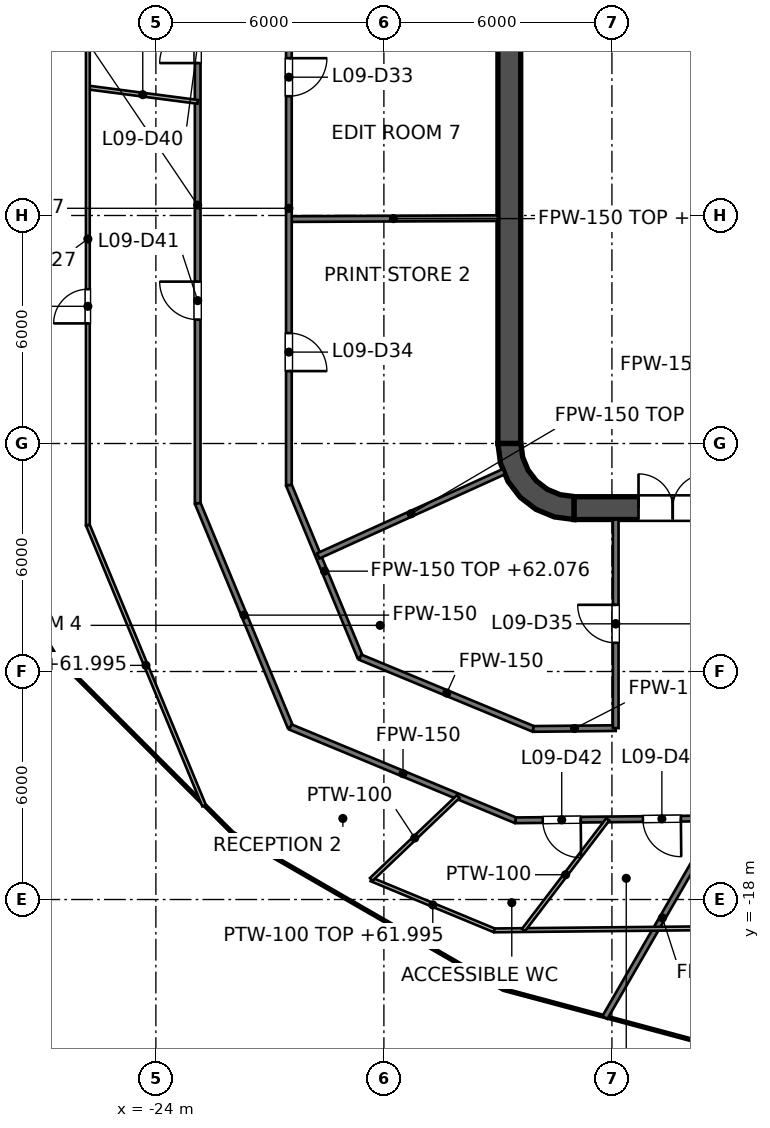
"""IFC4 building model, lengths in metres.
Left out: names, types, materials, properties, quantities, classifications, styles, units other than length and angle.
Written with IfcOpenShell. Run it as: python <this file> out.ifc"""

import sys

from ifc_helpers import new_model, si_unit, direction, frame, frame_2d, origin, place, context, subcontext, project, spatial, polyline, rectangle, outline, extrude, element, fill, save


model = new_model("IFC4")
c1 = context("Model", 3, precision=1e-05, world=origin(), true_north=direction((0.0, 1.0)))
c2 = subcontext(c1, "Body", "Model", "MODEL_VIEW")
j1 = project(units=[si_unit("LENGTHUNIT", "METRE"), si_unit("PLANEANGLEUNIT", "RADIAN")], contexts=[c1])
p1 = place(None, origin())
s1 = spatial("IfcSite", under=j1, at=p1, CompositionType="ELEMENT")
p2 = place(p1, origin())
s2 = spatial("IfcBuilding", under=s1, at=p2, CompositionType="ELEMENT")
p3 = place(p2, frame((0.0, 0.0, 58.8)))
s3 = spatial("IfcBuildingStorey", under=s2, at=p3, CompositionType="ELEMENT", Elevation=58.8)
p4 = place(p3, frame((-13.0, -7.7, 0.0), z_axis=(0.0, 0.0, 1.0), x_axis=(1.0, 0.0, 0.0)))
e1 = element("IfcWall", 1, at=p4, inside=s3, PredefinedType="SHEAR", context=c2, shape_type="SweptSolid", body=[
    extrude(rectangle(XDim=26.0, YDim=0.6, at=frame_2d((13.0, 0.0))), origin(), (0.0, 0.0, 1.0), 4.2),
])
p5 = place(p4, frame((1.7, 0.0, 0.0)))
e2 = element("IfcOpeningElement", 2, at=p5, cuts=e1, PredefinedType="OPENING", context=c2, shape_type="SweptSolid", body=[
    extrude(rectangle(XDim=1.8, YDim=2.1, at=frame_2d((0.9, 1.05))), frame((0.0, 0.3, 0.0), z_axis=(0.0, -1.0, 0.0), x_axis=(1.0, 0.0, 0.0)), (0.0, 0.0, 1.0), 0.6),
])
p6 = place(p4, frame((22.5, 0.0, 0.0)))
e3 = element("IfcOpeningElement", 3, at=p6, cuts=e1, PredefinedType="OPENING", context=c2, shape_type="SweptSolid", body=[
    extrude(rectangle(XDim=1.8, YDim=2.1, at=frame_2d((0.9, 1.05))), frame((0.0, 0.3, 0.0), z_axis=(0.0, -1.0, 0.0), x_axis=(1.0, 0.0, 0.0)), (0.0, 0.0, 1.0), 0.6),
])
p7 = place(p3, frame((-14.7, -6.0, 0.0), z_axis=(0.0, 0.0, 1.0), x_axis=(0.0, 1.0, 0.0)))
e4 = element("IfcWall", 4, at=p7, inside=s3, PredefinedType="SHEAR", context=c2, shape_type="SweptSolid", body=[
    extrude(rectangle(XDim=12.0, YDim=0.6, at=frame_2d((6.0, 0.0))), origin(), (0.0, 0.0, 1.0), 4.2),
])
p8 = place(p3, origin())
e5 = element("IfcWall", 5, at=p8, inside=s3, PredefinedType="SHEAR", context=c2, shape_type="SweptSolid", body=[
    extrude(outline(polyline([(-13.0, -8.0), (-13.0, -7.395), (-13.361, -7.347), (-13.698, -7.208), (-13.986, -6.986), (-14.208, -6.698), (-14.347, -6.361), (-14.395, -6.0), (-15.0, -6.0), (-14.932, -6.518), (-14.732, -7.0), (-14.414, -7.414), (-14.0, -7.732), (-13.518, -7.932), (-13.0, -8.0)])), origin(), (0.0, 0.0, 1.0), 4.2),
])
p9 = place(p3, frame((-11.8, -7.4, 0.0), z_axis=(0.0, 0.0, 1.0), x_axis=(0.0, 1.0, 0.0)))
e6 = element("IfcWall", 6, at=p9, inside=s3, PredefinedType="SOLIDWALL", context=c2, shape_type="SweptSolid", body=[
    extrude(rectangle(XDim=14.8, YDim=0.4, at=frame_2d((7.4, 0.0))), origin(), (0.0, 0.0, 1.0), 4.05),
])
p10 = place(p9, frame((11.2, 0.0, 0.0)))
e7 = element("IfcOpeningElement", 7, at=p10, cuts=e6, PredefinedType="OPENING", context=c2, shape_type="SweptSolid", body=[
    extrude(rectangle(XDim=1.1, YDim=2.1, at=frame_2d((0.55, 1.05))), frame((0.0, 0.2, 0.0), z_axis=(0.0, -1.0, 0.0), x_axis=(1.0, 0.0, 0.0)), (0.0, 0.0, 1.0), 0.4),
])
p11 = place(p9, frame((8.3, 0.0, 0.0)))
e8 = element("IfcOpeningElement", 8, at=p11, cuts=e6, PredefinedType="OPENING", context=c2, shape_type="SweptSolid", body=[
    extrude(rectangle(XDim=1.1, YDim=2.1, at=frame_2d((0.55, 1.05))), frame((0.0, 0.2, 0.0), z_axis=(0.0, -1.0, 0.0), x_axis=(1.0, 0.0, 0.0)), (0.0, 0.0, 1.0), 0.4),
])
p12 = place(p9, frame((5.4, 0.0, 0.0)))
e9 = element("IfcOpeningElement", 9, at=p12, cuts=e6, PredefinedType="OPENING", context=c2, shape_type="SweptSolid", body=[
    extrude(rectangle(XDim=1.1, YDim=2.1, at=frame_2d((0.55, 1.05))), frame((0.0, 0.2, 0.0), z_axis=(0.0, -1.0, 0.0), x_axis=(1.0, 0.0, 0.0)), (0.0, 0.0, 1.0), 0.4),
])
p13 = place(p9, frame((13.552, 0.0, 0.0)))
e10 = element("IfcOpeningElement", 10, at=p13, cuts=e6, PredefinedType="OPENING", context=c2, shape_type="SweptSolid", body=[
    extrude(rectangle(XDim=0.9, YDim=2.1, at=frame_2d((0.45, 1.05))), frame((0.0, 0.2, 0.0), z_axis=(0.0, -1.0, 0.0), x_axis=(1.0, 0.0, 0.0)), (0.0, 0.0, 1.0), 0.4),
])
p14 = place(p9, frame((0.347, 0.0, 0.0)))
e11 = element("IfcOpeningElement", 11, at=p14, cuts=e6, PredefinedType="OPENING", context=c2, shape_type="SweptSolid", body=[
    extrude(rectangle(XDim=0.9, YDim=2.1, at=frame_2d((0.45, 1.05))), frame((0.0, 0.2, 0.0), z_axis=(0.0, -1.0, 0.0), x_axis=(1.0, 0.0, 0.0)), (0.0, 0.0, 1.0), 0.4),
])
e12 = element("IfcWall", 12, at=p8, inside=s3, PredefinedType="SOLIDWALL", context=c2, shape_type="SweptSolid", body=[
    extrude(outline(polyline([(-12.0, -5.925), (-12.0, -5.675), (-14.15, -5.675), (-14.15, -3.025), (-12.0, -3.025), (-12.0, -2.775), (-14.15, -2.775), (-14.15, -0.125), (-12.0, -0.125), (-12.0, 0.125), (-14.15, 0.125), (-14.15, 2.775), (-12.0, 2.775), (-12.0, 3.025), (-14.15, 3.025), (-14.15, 5.675), (-12.0, 5.675), (-12.0, 5.925), (-14.15, 5.925), (-14.4, 5.925), (-14.4, 5.675), (-14.4, 3.025), (-14.4, 2.775), (-14.4, 0.125), (-14.4, -0.125), (-14.4, -2.775), (-14.4, -3.025), (-14.4, -5.675), (-14.4, -5.925), (-14.15, -5.925), (-12.0, -5.925)])), origin(), (0.0, 0.0, 1.0), 4.05),
])
p15 = place(p3, frame((-22.9, -7.572, 0.0), z_axis=(0.0, 0.0, 1.0), x_axis=(0.382860357704, -0.923806227788, 0.0)))
e13 = element("IfcWall", 13, at=p15, inside=s3, PredefinedType="PARTITIONING", context=c2, shape_type="SweptSolid", body=[
    extrude(rectangle(XDim=6.374, YDim=0.15, at=frame_2d((3.187, 0.0))), origin(), (0.0, 0.0, 1.0), 3.195),
])
p16 = place(p3, frame((-20.5, -7.095, 0.0), z_axis=(0.0, 0.0, 1.0), x_axis=(0.382878184095, -0.923798839653, 0.0)))
e14 = element("IfcWall", 14, at=p16, inside=s3, PredefinedType="PARTITIONING", context=c2, shape_type="SweptSolid", body=[
    extrude(rectangle(XDim=4.902, YDim=0.15, at=frame_2d((2.451, 0.0))), origin(), (0.0, 0.0, 1.0), 3.276),
])
p17 = place(p3, frame((-20.46, -13.46, 0.0), z_axis=(0.0, 0.0, 1.0), x_axis=(0.9237825057, -0.382917591869, 0.0)))
e15 = element("IfcWall", 15, at=p17, inside=s3, PredefinedType="PARTITIONING", context=c2, shape_type="SweptSolid", body=[
    extrude(rectangle(XDim=6.415, YDim=0.15, at=frame_2d((3.208, 0.0))), origin(), (0.0, 0.0, 1.0), 3.195),
])
p18 = place(p3, frame((-18.623, -11.623, 0.0), z_axis=(0.0, 0.0, 1.0), x_axis=(0.923791670587, -0.38289548098, 0.0)))
e16 = element("IfcWall", 16, at=p18, inside=s3, PredefinedType="PARTITIONING", context=c2, shape_type="SweptSolid", body=[
    extrude(rectangle(XDim=4.931, YDim=0.15, at=frame_2d((2.465, 0.0))), origin(), (0.0, 0.0, 1.0), 3.195),
])
p19 = place(p3, frame((-20.5, -0.094, 0.0), z_axis=(0.0, 0.0, 1.0), x_axis=(0.999990148138, 0.004438876723, 0.0)))
e17 = element("IfcWall", 17, at=p19, inside=s3, PredefinedType="PARTITIONING", context=c2, shape_type="SweptSolid", body=[
    extrude(rectangle(XDim=5.5, YDim=0.15, at=frame_2d((2.75, 0.0))), origin(), (0.0, 0.0, 1.0), 3.127),
])
p20 = place(p3, frame((-14.534, -15.916, 0.0), z_axis=(0.0, 0.0, 1.0), x_axis=(0.999950637767, 0.009935896005, 0.0)))
e18 = element("IfcWall", 18, at=p20, inside=s3, PredefinedType="PARTITIONING", context=c2, shape_type="SweptSolid", body=[
    extrude(rectangle(XDim=33.123, YDim=0.15, at=frame_2d((16.561, 0.0))), origin(), (0.0, 0.0, 1.0), 3.127),
])
p21 = place(p20, frame((0.713, 0.0, 0.0)))
e19 = element("IfcOpeningElement", 19, at=p21, cuts=e18, PredefinedType="OPENING", context=c2, shape_type="SweptSolid", body=[
    extrude(rectangle(XDim=1.0, YDim=2.1, at=frame_2d((0.5, 1.05))), frame((0.0, 0.075, 0.0), z_axis=(0.0, -1.0, 0.0), x_axis=(1.0, 0.0, 0.0)), (0.0, 0.0, 1.0), 0.15),
])
p22 = place(p20, frame((3.349, 0.0, 0.0)))
e20 = element("IfcOpeningElement", 20, at=p22, cuts=e18, PredefinedType="OPENING", context=c2, shape_type="SweptSolid", body=[
    extrude(rectangle(XDim=1.0, YDim=2.1, at=frame_2d((0.5, 1.05))), frame((0.0, 0.075, 0.0), z_axis=(0.0, -1.0, 0.0), x_axis=(1.0, 0.0, 0.0)), (0.0, 0.0, 1.0), 0.15),
])
p23 = place(p20, frame((16.111, 0.0, 0.0)))
e21 = element("IfcOpeningElement", 21, at=p23, cuts=e18, PredefinedType="OPENING", context=c2, shape_type="SweptSolid", body=[
    extrude(rectangle(XDim=1.0, YDim=2.1, at=frame_2d((0.5, 1.05))), frame((0.0, 0.075, 0.0), z_axis=(0.0, -1.0, 0.0), x_axis=(1.0, 0.0, 0.0)), (0.0, 0.0, 1.0), 0.15),
])
p24 = place(p20, frame((25.386, 0.0, 0.0)))
e22 = element("IfcOpeningElement", 22, at=p24, cuts=e18, PredefinedType="OPENING", context=c2, shape_type="SweptSolid", body=[
    extrude(rectangle(XDim=1.0, YDim=2.1, at=frame_2d((0.5, 1.05))), frame((0.0, 0.075, 0.0), z_axis=(0.0, -1.0, 0.0), x_axis=(1.0, 0.0, 0.0)), (0.0, 0.0, 1.0), 0.15),
])
p25 = place(p3, frame((-14.068, -13.511, 0.0), z_axis=(0.0, 0.0, 1.0), x_axis=(0.999950911515, 0.009908307647, 0.0)))
e23 = element("IfcWall", 23, at=p25, inside=s3, PredefinedType="PARTITIONING", context=c2, shape_type="SweptSolid", body=[
    extrude(rectangle(XDim=2.168, YDim=0.15, at=frame_2d((1.084, 0.0))), origin(), (0.0, 0.0, 1.0), 3.195),
])
p26 = place(p3, frame((-19.728, -8.958, 0.0), z_axis=(0.0, 0.0, 1.0), x_axis=(0.910629511797, 0.413223779863, 0.0)))
e24 = element("IfcWall", 24, at=p26, inside=s3, PredefinedType="PARTITIONING", context=c2, shape_type="SweptSolid", body=[
    extrude(rectangle(XDim=5.368, YDim=0.15, at=frame_2d((2.684, 0.0))), origin(), (0.0, 0.0, 1.0), 4.05),
])
p27 = place(p3, frame((-12.184, -21.103, 0.0), z_axis=(0.0, 0.0, 1.0), x_axis=(0.500022810783, 0.866012233572, 0.0)))
e25 = element("IfcWall", 25, at=p27, inside=s3, PredefinedType="PARTITIONING", context=c2, shape_type="SweptSolid", body=[
    extrude(rectangle(XDim=6.051, YDim=0.15, at=frame_2d((3.025, 0.0))), origin(), (0.0, 0.0, 1.0), 3.502),
])
p28 = place(p3, frame((-11.9, -13.49, 0.0), z_axis=(0.0, 0.0, 1.0), x_axis=(0.0, 1.0, 0.0)))
e26 = element("IfcWall", 26, at=p28, inside=s3, PredefinedType="PARTITIONING", context=c2, shape_type="SweptSolid", body=[
    extrude(rectangle(XDim=5.49, YDim=0.15, at=frame_2d((2.745, 0.0))), origin(), (0.0, 0.0, 1.0), 3.195),
])
p29 = place(p28, frame((2.245, 0.0, 0.0)))
e27 = element("IfcOpeningElement", 27, at=p29, cuts=e26, PredefinedType="OPENING", context=c2, shape_type="SweptSolid", body=[
    extrude(rectangle(XDim=1.0, YDim=2.1, at=frame_2d((0.5, 1.05))), frame((0.0, 0.075, 0.0), z_axis=(0.0, -1.0, 0.0), x_axis=(1.0, 0.0, 0.0)), (0.0, 0.0, 1.0), 0.15),
])
p30 = place(p3, frame((-20.5, -7.095, 0.0), z_axis=(0.0, 0.0, 1.0), x_axis=(0.0, 1.0, 0.0)))
e28 = element("IfcWall", 28, at=p30, inside=s3, PredefinedType="PARTITIONING", context=c2, shape_type="SweptSolid", body=[
    extrude(rectangle(XDim=14.569, YDim=0.15, at=frame_2d((7.285, 0.0))), origin(), (0.0, 0.0, 1.0), 3.127),
])
p31 = place(p30, frame((10.234, 0.0, 0.0)))
e29 = element("IfcOpeningElement", 29, at=p31, cuts=e28, PredefinedType="OPENING", context=c2, shape_type="SweptSolid", body=[
    extrude(rectangle(XDim=1.0, YDim=2.1, at=frame_2d((0.5, 1.05))), frame((0.0, 0.075, 0.0), z_axis=(0.0, -1.0, 0.0), x_axis=(1.0, 0.0, 0.0)), (0.0, 0.0, 1.0), 0.15),
])
p32 = place(p30, frame((3.0, 0.0, 0.0)))
e30 = element("IfcOpeningElement", 30, at=p32, cuts=e28, PredefinedType="OPENING", context=c2, shape_type="SweptSolid", body=[
    extrude(rectangle(XDim=1.0, YDim=2.1, at=frame_2d((0.5, 1.05))), frame((0.0, 0.075, 0.0), z_axis=(0.0, -1.0, 0.0), x_axis=(1.0, 0.0, 0.0)), (0.0, 0.0, 1.0), 0.15),
])
p33 = place(p3, frame((-22.9, -7.572, 0.0), z_axis=(0.0, 0.0, 1.0), x_axis=(0.0, 1.0, 0.0)))
e31 = element("IfcWall", 31, at=p33, inside=s3, PredefinedType="PARTITIONING", context=c2, shape_type="SweptSolid", body=[
    extrude(rectangle(XDim=15.689, YDim=0.15, at=frame_2d((7.844, 0.0))), origin(), (0.0, 0.0, 1.0), 3.127),
])
p34 = place(p33, frame((11.583, 0.0, 0.0)))
e32 = element("IfcOpeningElement", 32, at=p34, cuts=e31, PredefinedType="OPENING", context=c2, shape_type="SweptSolid", body=[
    extrude(rectangle(XDim=1.0, YDim=2.1, at=frame_2d((0.5, 1.05))), frame((0.0, 0.075, 0.0), z_axis=(0.0, -1.0, 0.0), x_axis=(1.0, 0.0, 0.0)), (0.0, 0.0, 1.0), 0.15),
])
p35 = place(p33, frame((4.832, 0.0, 0.0)))
e33 = element("IfcOpeningElement", 33, at=p35, cuts=e31, PredefinedType="OPENING", context=c2, shape_type="SweptSolid", body=[
    extrude(rectangle(XDim=1.0, YDim=2.1, at=frame_2d((0.5, 1.05))), frame((0.0, 0.075, 0.0), z_axis=(0.0, -1.0, 0.0), x_axis=(1.0, 0.0, 0.0)), (0.0, 0.0, 1.0), 0.15),
])
p36 = place(p3, frame((-25.79, -8.147, 0.0), z_axis=(0.0, 0.0, 1.0), x_axis=(0.3827816734, -0.923838833623, 0.0)))
e34 = element("IfcWall", 34, at=p36, inside=s3, PredefinedType="PARTITIONING", context=c2, shape_type="SweptSolid", body=[
    extrude(rectangle(XDim=7.992, YDim=0.1, at=frame_2d((3.996, 0.0))), origin(), (0.0, 0.0, 1.0), 3.195),
])
p37 = place(p3, frame((-18.332, -17.471, 0.0), z_axis=(0.0, 0.0, 1.0), x_axis=(0.923856315575, -0.3827394782, 0.0)))
e35 = element("IfcWall", 35, at=p37, inside=s3, PredefinedType="PARTITIONING", context=c2, shape_type="SweptSolid", body=[
    extrude(rectangle(XDim=3.504, YDim=0.1, at=frame_2d((1.752, 0.0))), origin(), (0.0, 0.0, 1.0), 3.195),
])
p38 = place(p3, frame((-25.79, 3.368, 0.0), z_axis=(0.0, 0.0, 1.0), x_axis=(0.991601345334, -0.129332022064, 0.0)))
e36 = element("IfcWall", 36, at=p38, inside=s3, PredefinedType="PARTITIONING", context=c2, shape_type="SweptSolid", body=[
    extrude(rectangle(XDim=2.915, YDim=0.1, at=frame_2d((1.457, 0.0))), origin(), (0.0, 0.0, 1.0), 4.05),
])
p39 = place(p3, frame((-15.095, -18.812, 0.0), z_axis=(0.0, 0.0, 1.0), x_axis=(0.999950080065, 0.009991865576, 0.0)))
e37 = element("IfcWall", 37, at=p39, inside=s3, PredefinedType="PARTITIONING", context=c2, shape_type="SweptSolid", body=[
    extrude(rectangle(XDim=33.255, YDim=0.1, at=frame_2d((16.627, 0.0))), origin(), (0.0, 0.0, 1.0), 3.127),
])
p40 = place(p39, frame((11.671, 0.0, 0.0)))
e38 = element("IfcOpeningElement", 38, at=p40, cuts=e37, PredefinedType="OPENING", context=c2, shape_type="SweptSolid", body=[
    extrude(rectangle(XDim=0.9, YDim=2.1, at=frame_2d((0.45, 1.05))), frame((0.0, 0.05, 0.0), z_axis=(0.0, -1.0, 0.0), x_axis=(1.0, 0.0, 0.0)), (0.0, 0.0, 1.0), 0.1),
])
p41 = place(p39, frame((25.918, 0.0, 0.0)))
e39 = element("IfcOpeningElement", 39, at=p41, cuts=e37, PredefinedType="OPENING", context=c2, shape_type="SweptSolid", body=[
    extrude(rectangle(XDim=0.9, YDim=2.1, at=frame_2d((0.45, 1.05))), frame((0.0, 0.05, 0.0), z_axis=(0.0, -1.0, 0.0), x_axis=(1.0, 0.0, 0.0)), (0.0, 0.0, 1.0), 0.1),
])
p42 = place(p3, frame((-18.332, -17.471, 0.0), z_axis=(0.0, 0.0, 1.0), x_axis=(0.723856845345, 0.689950192005, 0.0)))
e40 = element("IfcWall", 40, at=p42, inside=s3, PredefinedType="PARTITIONING", context=c2, shape_type="SweptSolid", body=[
    extrude(rectangle(XDim=3.161, YDim=0.1, at=frame_2d((1.581, 0.0))), origin(), (0.0, 0.0, 1.0), 4.05),
])
p43 = place(p3, frame((-14.328, -18.804, 0.0), z_axis=(0.0, 0.0, 1.0), x_axis=(0.606117553719, 0.795375075718, 0.0)))
e41 = element("IfcWall", 41, at=p43, inside=s3, PredefinedType="PARTITIONING", context=c2, shape_type="SweptSolid", body=[
    extrude(rectangle(XDim=3.661, YDim=0.1, at=frame_2d((1.831, 0.0))), origin(), (0.0, 0.0, 1.0), 4.05),
])
p44 = place(p3, frame((-25.79, -8.147, 0.0), z_axis=(0.0, 0.0, 1.0), x_axis=(0.0, 1.0, 0.0)))
e42 = element("IfcWall", 42, at=p44, inside=s3, PredefinedType="PARTITIONING", context=c2, shape_type="SweptSolid", body=[
    extrude(rectangle(XDim=15.057, YDim=0.1, at=frame_2d((7.528, 0.0))), origin(), (0.0, 0.0, 1.0), 3.127),
])
p45 = place(p44, frame((5.308, 0.0, 0.0)))
e43 = element("IfcOpeningElement", 43, at=p45, cuts=e42, PredefinedType="OPENING", context=c2, shape_type="SweptSolid", body=[
    extrude(rectangle(XDim=0.9, YDim=2.1, at=frame_2d((0.45, 1.05))), frame((0.0, 0.05, 0.0), z_axis=(0.0, -1.0, 0.0), x_axis=(1.0, 0.0, 0.0)), (0.0, 0.0, 1.0), 0.1),
])
p46 = place(p10, origin())
e44 = element("IfcDoor", 44, at=p46, inside=s3, OperationType="DOUBLE_DOOR_SLIDING", PredefinedType="DOOR", context=c2, shape_type="SweptSolid", body=[
    extrude(rectangle(XDim=1.1, YDim=2.1, at=frame_2d((0.55, 1.05))), frame((0.0, 0.025, 0.0), z_axis=(0.0, -1.0, 0.0), x_axis=(1.0, 0.0, 0.0)), (0.0, 0.0, 1.0), 0.05),
])
fill(e7, e44)
p47 = place(p11, origin())
e45 = element("IfcDoor", 45, at=p47, inside=s3, OperationType="DOUBLE_DOOR_SLIDING", PredefinedType="DOOR", context=c2, shape_type="SweptSolid", body=[
    extrude(rectangle(XDim=1.1, YDim=2.1, at=frame_2d((0.55, 1.05))), frame((0.0, 0.025, 0.0), z_axis=(0.0, -1.0, 0.0), x_axis=(1.0, 0.0, 0.0)), (0.0, 0.0, 1.0), 0.05),
])
fill(e8, e45)
p48 = place(p12, origin())
e46 = element("IfcDoor", 46, at=p48, inside=s3, OperationType="DOUBLE_DOOR_SLIDING", PredefinedType="DOOR", context=c2, shape_type="SweptSolid", body=[
    extrude(rectangle(XDim=1.1, YDim=2.1, at=frame_2d((0.55, 1.05))), frame((0.0, 0.025, 0.0), z_axis=(0.0, -1.0, 0.0), x_axis=(1.0, 0.0, 0.0)), (0.0, 0.0, 1.0), 0.05),
])
fill(e9, e46)
p49 = place(p14, origin())
e47 = element("IfcDoor", 47, at=p49, inside=s3, OperationType="SINGLE_SWING_LEFT", PredefinedType="DOOR", context=c2, shape_type="SweptSolid", body=[
    extrude(rectangle(XDim=0.9, YDim=2.1, at=frame_2d((0.45, 1.05))), frame((0.0, 0.025, 0.0), z_axis=(0.0, -1.0, 0.0), x_axis=(1.0, 0.0, 0.0)), (0.0, 0.0, 1.0), 0.05),
])
fill(e11, e47)
p50 = place(p5, origin())
e48 = element("IfcDoor", 48, at=p50, inside=s3, OperationType="DOUBLE_DOOR_SINGLE_SWING", PredefinedType="DOOR", context=c2, shape_type="SweptSolid", body=[
    extrude(rectangle(XDim=1.8, YDim=2.1, at=frame_2d((0.9, 1.05))), frame((0.0, 0.025, 0.0), z_axis=(0.0, -1.0, 0.0), x_axis=(1.0, 0.0, 0.0)), (0.0, 0.0, 1.0), 0.05),
])
fill(e2, e48)
p51 = place(p31, origin())
e49 = element("IfcDoor", 49, at=p51, inside=s3, OperationType="SINGLE_SWING_RIGHT", PredefinedType="DOOR", context=c2, shape_type="SweptSolid", body=[
    extrude(rectangle(XDim=1.0, YDim=2.1, at=frame_2d((0.5, 1.05))), frame((0.0, 0.025, 0.0), z_axis=(0.0, -1.0, 0.0), x_axis=(1.0, 0.0, 0.0)), (0.0, 0.0, 1.0), 0.05),
])
fill(e29, e49)
p52 = place(p32, origin())
e50 = element("IfcDoor", 50, at=p52, inside=s3, OperationType="SINGLE_SWING_LEFT", PredefinedType="DOOR", context=c2, shape_type="SweptSolid", body=[
    extrude(rectangle(XDim=1.0, YDim=2.1, at=frame_2d((0.5, 1.05))), frame((0.0, 0.025, 0.0), z_axis=(0.0, -1.0, 0.0), x_axis=(1.0, 0.0, 0.0)), (0.0, 0.0, 1.0), 0.05),
])
fill(e30, e50)
p53 = place(p29, origin())
e51 = element("IfcDoor", 51, at=p53, inside=s3, OperationType="SINGLE_SWING_RIGHT", PredefinedType="DOOR", context=c2, shape_type="SweptSolid", body=[
    extrude(rectangle(XDim=1.0, YDim=2.1, at=frame_2d((0.5, 1.05))), frame((0.0, 0.025, 0.0), z_axis=(0.0, -1.0, 0.0), x_axis=(1.0, 0.0, 0.0)), (0.0, 0.0, 1.0), 0.05),
])
fill(e27, e51)
p54 = place(p34, origin())
e52 = element("IfcDoor", 52, at=p54, inside=s3, OperationType="SINGLE_SWING_LEFT", PredefinedType="DOOR", context=c2, shape_type="SweptSolid", body=[
    extrude(rectangle(XDim=1.0, YDim=2.1, at=frame_2d((0.5, 1.05))), frame((0.0, 0.025, 0.0), z_axis=(0.0, -1.0, 0.0), x_axis=(1.0, 0.0, 0.0)), (0.0, 0.0, 1.0), 0.05),
])
fill(e32, e52)
p55 = place(p35, origin())
e53 = element("IfcDoor", 53, at=p55, inside=s3, OperationType="SINGLE_SWING_RIGHT", PredefinedType="DOOR", context=c2, shape_type="SweptSolid", body=[
    extrude(rectangle(XDim=1.0, YDim=2.1, at=frame_2d((0.5, 1.05))), frame((0.0, 0.025, 0.0), z_axis=(0.0, -1.0, 0.0), x_axis=(1.0, 0.0, 0.0)), (0.0, 0.0, 1.0), 0.05),
])
fill(e33, e53)
p56 = place(p21, origin())
e54 = element("IfcDoor", 54, at=p56, inside=s3, OperationType="SINGLE_SWING_RIGHT", PredefinedType="DOOR", context=c2, shape_type="SweptSolid", body=[
    extrude(rectangle(XDim=1.0, YDim=2.1, at=frame_2d((0.5, 1.05))), frame((0.0, 0.025, 0.0), z_axis=(0.0, -1.0, 0.0), x_axis=(1.0, 0.0, 0.0)), (0.0, 0.0, 1.0), 0.05),
])
fill(e19, e54)
p57 = place(p22, origin())
e55 = element("IfcDoor", 55, at=p57, inside=s3, OperationType="SINGLE_SWING_RIGHT", PredefinedType="DOOR", context=c2, shape_type="SweptSolid", body=[
    extrude(rectangle(XDim=1.0, YDim=2.1, at=frame_2d((0.5, 1.05))), frame((0.0, 0.025, 0.0), z_axis=(0.0, -1.0, 0.0), x_axis=(1.0, 0.0, 0.0)), (0.0, 0.0, 1.0), 0.05),
])
fill(e20, e55)
p58 = place(p45, origin())
e56 = element("IfcDoor", 56, at=p58, inside=s3, OperationType="SINGLE_SWING_LEFT", PredefinedType="DOOR", context=c2, shape_type="SweptSolid", body=[
    extrude(rectangle(XDim=0.9, YDim=2.1, at=frame_2d((0.45, 1.05))), frame((0.0, 0.025, 0.0), z_axis=(0.0, -1.0, 0.0), x_axis=(1.0, 0.0, 0.0)), (0.0, 0.0, 1.0), 0.05),
])
fill(e43, e56)
save(model, sys.argv[1])
